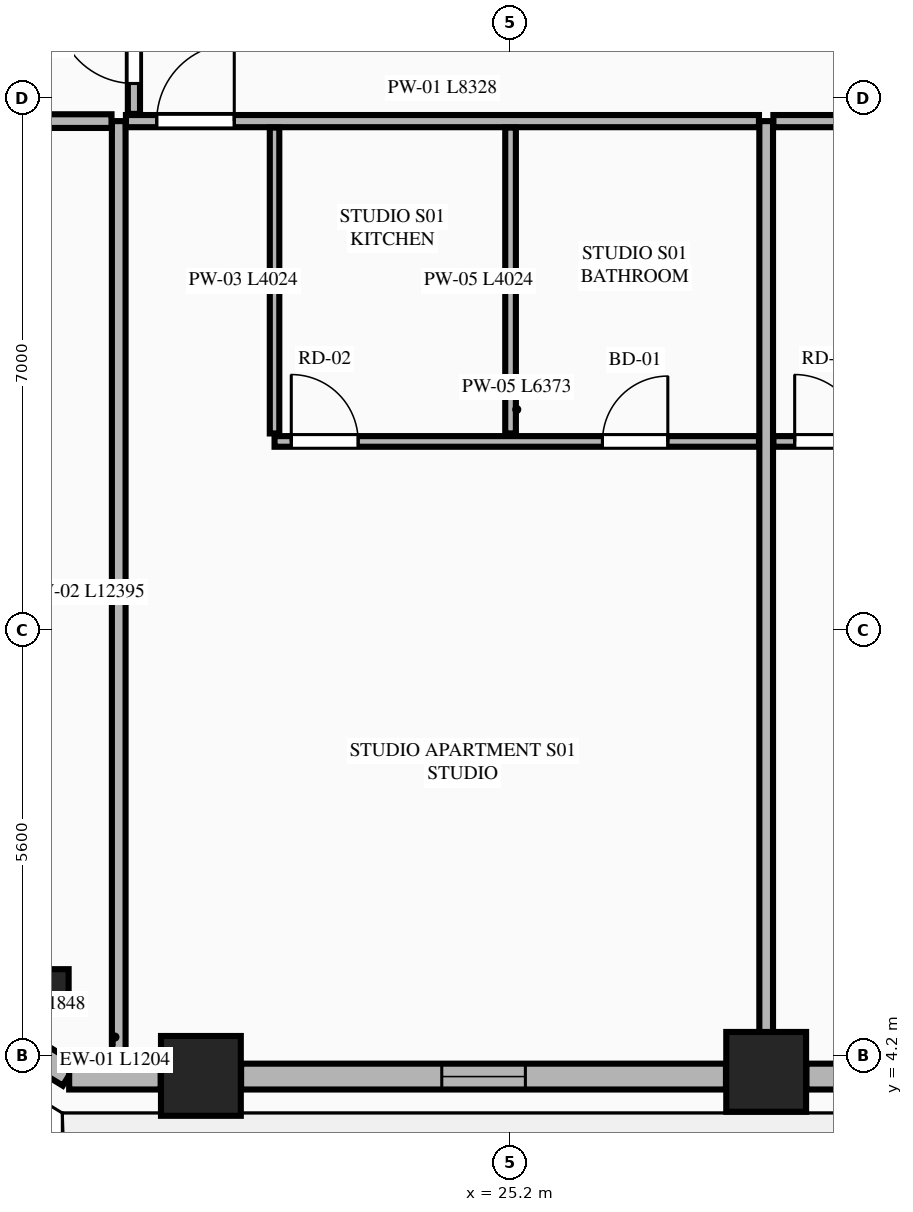
"""IFC4 building model, lengths in metres.
Left out: names, types, materials, properties, quantities, classifications, styles, units other than length and angle.
Written with IfcOpenShell. Run it as: python <this file> out.ifc"""

import sys

from ifc_helpers import new_model, si_unit, direction, frame, frame_2d, origin, origin_2d, place, context, subcontext, project, spatial, rectangle, extrude, element, fill, save


model = new_model("IFC4")
c1 = context("Model", 3, precision=1e-05, world=origin(), true_north=direction((0.0, 1.0)))
c2 = subcontext(c1, "Body", "Model", "MODEL_VIEW")
j1 = project(units=[si_unit("LENGTHUNIT", "METRE"), si_unit("PLANEANGLEUNIT", "RADIAN")], contexts=[c1])
p1 = place(None, origin())
s1 = spatial("IfcSite", under=j1, at=p1, CompositionType="ELEMENT")
p2 = place(p1, origin())
s2 = spatial("IfcBuilding", under=s1, at=p2, CompositionType="ELEMENT")
p3 = place(p2, frame((0.0, 0.0, 112.6)))
s3 = spatial("IfcBuildingStorey", under=s2, at=p3, CompositionType="ELEMENT", Elevation=112.6)
for number, where, z_axis, x_axis in (
    (1, (21.131, 3.939, 0.0), (0.0, 0.0, 1.0), (1.0, 0.0, 0.0)),
    (2, (28.568, 3.992, 0.0), (0.0, 0.0, 1.0), (1.0, 0.0, 0.0)),
):
    element("IfcColumn", number, at=place(p3, frame(where, z_axis=z_axis, x_axis=x_axis)), inside=s3, PredefinedType="COLUMN", context=c2, shape_type="SweptSolid", body=[
        extrude(rectangle(XDim=1.05, YDim=1.05, at=origin_2d()), origin(), (0.0, 0.0, 1.0), 3.55),
    ])
p4 = place(p3, frame((19.141, 5.093, 0.0), z_axis=(0.0, 0.0, 1.0), x_axis=(0.865160173452, -0.501495637342, 0.0)))
e3 = element("IfcColumn", 3, at=p4, inside=s3, PredefinedType="PILASTER", context=c2, shape_type="SweptSolid", body=[
    extrude(rectangle(XDim=0.5, YDim=0.35, at=origin_2d()), origin(), (0.0, 0.0, 1.0), 3.55),
])
p5 = place(p3, frame((17.829, 4.923, 0.0), z_axis=(0.0, 0.0, 1.0), x_axis=(0.851798915137, -0.523868884523, 0.0)))
e4 = element("IfcWall", 4, at=p5, inside=s3, PredefinedType="STANDARD", context=c2, shape_type="SweptSolid", body=[
    extrude(rectangle(XDim=1.848, YDim=0.34, at=frame_2d((0.924, 0.0))), origin(), (0.0, 0.0, 1.0), 3.34),
])
p6 = place(p3, frame((19.398, 3.93, 0.0), z_axis=(0.0, 0.0, 1.0), x_axis=(1.0, 0.0, 0.0)))
e5 = element("IfcWall", 5, at=p6, inside=s3, PredefinedType="STANDARD", context=c2, shape_type="SweptSolid", body=[
    extrude(rectangle(XDim=1.204, YDim=0.34, at=frame_2d((0.602, 0.0))), origin(), (0.0, 0.0, 1.0), 3.34),
])
p7 = place(p3, frame((21.66, 3.93, 0.0), z_axis=(0.0, 0.0, 1.0), x_axis=(1.0, 0.0, 0.0)))
e6 = element("IfcWall", 6, at=p7, inside=s3, PredefinedType="STANDARD", context=c2, shape_type="SweptSolid", body=[
    extrude(rectangle(XDim=6.379, YDim=0.34, at=frame_2d((3.189, 0.0))), origin(), (0.0, 0.0, 1.0), 2.797),
])
p8 = place(p7, frame((2.64, 0.0, 0.75)))
e7 = element("IfcOpeningElement", 7, at=p8, cuts=e6, PredefinedType="OPENING", context=c2, shape_type="SweptSolid", body=[
    extrude(rectangle(XDim=1.1, YDim=1.897, at=frame_2d((0.55, 0.948))), frame((0.0, 0.18, 0.0), z_axis=(0.0, -1.0, 0.0), x_axis=(1.0, 0.0, 0.0)), (0.0, 0.0, 1.0), 0.36),
])
p9 = place(p3, frame((29.097, 3.93, 0.0), z_axis=(0.0, 0.0, 1.0), x_axis=(1.0, 0.0, 0.0)))
e8 = element("IfcWall", 8, at=p9, inside=s3, PredefinedType="STANDARD", context=c2, shape_type="SweptSolid", body=[
    extrude(rectangle(XDim=6.606, YDim=0.34, at=frame_2d((3.303, 0.0))), origin(), (0.0, 0.0, 1.0), 2.797),
])
p10 = place(p9, frame((1.775, 0.0, 0.0)))
e9 = element("IfcOpeningElement", 9, at=p10, cuts=e8, PredefinedType="OPENING", context=c2, shape_type="SweptSolid", body=[
    extrude(rectangle(XDim=1.1, YDim=2.25, at=frame_2d((0.55, 1.125))), frame((0.0, 0.18, 0.0), z_axis=(0.0, -1.0, 0.0), x_axis=(1.0, 0.0, 0.0)), (0.0, 0.0, 1.0), 0.36),
])
p11 = place(p9, frame((5.186, 0.0, 0.75)))
e10 = element("IfcOpeningElement", 10, at=p11, cuts=e8, PredefinedType="OPENING", context=c2, shape_type="SweptSolid", body=[
    extrude(rectangle(XDim=1.1, YDim=1.897, at=frame_2d((0.55, 0.948))), frame((0.0, 0.18, 0.0), z_axis=(0.0, -1.0, 0.0), x_axis=(1.0, 0.0, 0.0)), (0.0, 0.0, 1.0), 0.36),
])
p12 = place(p3, frame((20.05, 4.105, 0.0), z_axis=(0.0, 0.0, 1.0), x_axis=(0.0, 1.0, 0.0)))
e11 = element("IfcWall", 11, at=p12, inside=s3, PredefinedType="PARTITIONING", context=c2, shape_type="SweptSolid", body=[
    extrude(rectangle(XDim=12.395, YDim=0.18, at=frame_2d((6.198, 0.0))), origin(), (0.0, 0.0, 1.0), 3.34),
])
p13 = place(p3, frame((28.568, 4.105, 0.0), z_axis=(0.0, 0.0, 1.0), x_axis=(0.0, 1.0, 0.0)))
e12 = element("IfcWall", 12, at=p13, inside=s3, PredefinedType="PARTITIONING", context=c2, shape_type="SweptSolid", body=[
    extrude(rectangle(XDim=12.395, YDim=0.18, at=frame_2d((6.198, 0.0))), origin(), (0.0, 0.0, 1.0), 2.722),
])
p14 = place(p3, frame((20.145, 16.5, 0.0), z_axis=(0.0, 0.0, 1.0), x_axis=(1.0, 0.0, 0.0)))
e13 = element("IfcWall", 13, at=p14, inside=s3, PredefinedType="PARTITIONING", context=c2, shape_type="SweptSolid", body=[
    extrude(rectangle(XDim=8.328, YDim=0.16, at=frame_2d((4.164, 0.0))), origin(), (0.0, 0.0, 1.0), 3.34),
])
p15 = place(p14, frame((0.405, 0.0, 0.0)))
e14 = element("IfcOpeningElement", 14, at=p15, cuts=e13, PredefinedType="OPENING", context=c2, shape_type="SweptSolid", body=[
    extrude(rectangle(XDim=1.02, YDim=2.25, at=frame_2d((0.51, 1.125))), frame((0.0, 0.09, 0.0), z_axis=(0.0, -1.0, 0.0), x_axis=(1.0, 0.0, 0.0)), (0.0, 0.0, 1.0), 0.18),
])
p16 = place(p3, frame((22.1, 12.391, 0.0), z_axis=(0.0, 0.0, 1.0), x_axis=(0.0, 1.0, 0.0)))
e15 = element("IfcWall", 15, at=p16, inside=s3, PredefinedType="PARTITIONING", context=c2, shape_type="SweptSolid", body=[
    extrude(rectangle(XDim=4.024, YDim=0.125, at=frame_2d((2.012, 0.0))), origin(), (0.0, 0.0, 1.0), 2.722),
])
p17 = place(p3, frame((22.1, 12.286, 0.0), z_axis=(0.0, 0.0, 1.0), x_axis=(1.0, 0.0, 0.0)))
e16 = element("IfcWall", 16, at=p17, inside=s3, PredefinedType="PLUMBINGWALL", context=c2, shape_type="SweptSolid", body=[
    extrude(rectangle(XDim=6.373, YDim=0.14, at=frame_2d((3.187, 0.0))), origin(), (0.0, 0.0, 1.0), 3.34),
])
p18 = place(p17, frame((4.314, 0.0, 0.0)))
e17 = element("IfcOpeningElement", 17, at=p18, cuts=e16, PredefinedType="OPENING", context=c2, shape_type="SweptSolid", body=[
    extrude(rectangle(XDim=0.86, YDim=2.1, at=frame_2d((0.43, 1.05))), frame((0.0, 0.08, 0.0), z_axis=(0.0, -1.0, 0.0), x_axis=(1.0, 0.0, 0.0)), (0.0, 0.0, 1.0), 0.16),
])
p19 = place(p17, frame((0.22, 0.0, 0.0)))
e18 = element("IfcOpeningElement", 18, at=p19, cuts=e16, PredefinedType="OPENING", context=c2, shape_type="SweptSolid", body=[
    extrude(rectangle(XDim=0.88, YDim=2.15, at=frame_2d((0.44, 1.075))), frame((0.0, 0.08, 0.0), z_axis=(0.0, -1.0, 0.0), x_axis=(1.0, 0.0, 0.0)), (0.0, 0.0, 1.0), 0.16),
])
p20 = place(p3, frame((25.205, 12.391, 0.0), z_axis=(0.0, 0.0, 1.0), x_axis=(0.0, 1.0, 0.0)))
e19 = element("IfcWall", 19, at=p20, inside=s3, PredefinedType="PLUMBINGWALL", context=c2, shape_type="SweptSolid", body=[
    extrude(rectangle(XDim=4.024, YDim=0.14, at=frame_2d((2.012, 0.0))), origin(), (0.0, 0.0, 1.0), 3.34),
])
p21 = place(p3, frame((28.663, 16.5, 0.0), z_axis=(0.0, 0.0, 1.0), x_axis=(1.0, 0.0, 0.0)))
e20 = element("IfcWall", 20, at=p21, inside=s3, PredefinedType="PARTITIONING", context=c2, shape_type="SweptSolid", body=[
    extrude(rectangle(XDim=15.992, YDim=0.16, at=frame_2d((7.996, 0.0))), origin(), (0.0, 0.0, 1.0), 3.34),
])
p22 = place(p21, frame((14.087, 0.0, 0.0)))
e21 = element("IfcOpeningElement", 21, at=p22, cuts=e20, PredefinedType="OPENING", context=c2, shape_type="SweptSolid", body=[
    extrude(rectangle(XDim=1.02, YDim=2.25, at=frame_2d((0.51, 1.125))), frame((0.0, 0.09, 0.0), z_axis=(0.0, -1.0, 0.0), x_axis=(1.0, 0.0, 0.0)), (0.0, 0.0, 1.0), 0.18),
])
p23 = place(p3, frame((28.663, 12.286, 0.0), z_axis=(0.0, 0.0, 1.0), x_axis=(1.0, 0.0, 0.0)))
e22 = element("IfcWall", 22, at=p23, inside=s3, PredefinedType="PLUMBINGWALL", context=c2, shape_type="SweptSolid", body=[
    extrude(rectangle(XDim=5.112, YDim=0.14, at=frame_2d((2.556, 0.0))), origin(), (0.0, 0.0, 1.0), 3.34),
])
p24 = place(p23, frame((0.28, 0.0, 0.0)))
e23 = element("IfcOpeningElement", 23, at=p24, cuts=e22, PredefinedType="OPENING", context=c2, shape_type="SweptSolid", body=[
    extrude(rectangle(XDim=0.88, YDim=2.15, at=frame_2d((0.44, 1.075))), frame((0.0, 0.08, 0.0), z_axis=(0.0, -1.0, 0.0), x_axis=(1.0, 0.0, 0.0)), (0.0, 0.0, 1.0), 0.16),
])
p25 = place(p23, frame((1.988, 0.0, 0.0)))
e24 = element("IfcOpeningElement", 24, at=p25, cuts=e22, PredefinedType="OPENING", context=c2, shape_type="SweptSolid", body=[
    extrude(rectangle(XDim=0.86, YDim=2.1, at=frame_2d((0.43, 1.05))), frame((0.0, 0.08, 0.0), z_axis=(0.0, -1.0, 0.0), x_axis=(1.0, 0.0, 0.0)), (0.0, 0.0, 1.0), 0.16),
])
p26 = place(p3, frame((12.185, 16.5, 0.0), z_axis=(0.0, 0.0, 1.0), x_axis=(1.0, 0.0, 0.0)))
e25 = element("IfcWall", 25, at=p26, inside=s3, PredefinedType="PARTITIONING", context=c2, shape_type="SweptSolid", body=[
    extrude(rectangle(XDim=7.77, YDim=0.18, at=frame_2d((3.885, 0.0))), origin(), (0.0, 0.0, 1.0), 3.34),
])
p27 = place(p3, frame((20.25, 16.595, 0.0), z_axis=(0.0, 0.0, 1.0), x_axis=(0.0, 1.0, 0.0)))
e26 = element("IfcWall", 26, at=p27, inside=s3, PredefinedType="PARTITIONING", context=c2, shape_type="SweptSolid", body=[
    extrude(rectangle(XDim=6.39, YDim=0.16, at=frame_2d((3.195, 0.0))), origin(), (0.0, 0.0, 1.0), 3.34),
])
p28 = place(p27, frame((0.4, 0.0, 0.0)))
e27 = element("IfcOpeningElement", 27, at=p28, cuts=e26, PredefinedType="OPENING", context=c2, shape_type="SweptSolid", body=[
    extrude(rectangle(XDim=1.02, YDim=2.25, at=frame_2d((0.51, 1.125))), frame((0.0, 0.09, 0.0), z_axis=(0.0, -1.0, 0.0), x_axis=(1.0, 0.0, 0.0)), (0.0, 0.0, 1.0), 0.18),
])
p29 = place(p8, origin())
e28 = element("IfcWindow", 28, at=p29, inside=s3, PartitioningType="SINGLE_PANEL", PredefinedType="WINDOW", context=c2, shape_type="SweptSolid", body=[
    extrude(rectangle(XDim=1.1, YDim=1.897, at=frame_2d((0.55, 0.948))), frame((0.0, 0.03, 0.0), z_axis=(0.0, -1.0, 0.0), x_axis=(1.0, 0.0, 0.0)), (0.0, 0.0, 1.0), 0.06),
])
fill(e7, e28)
p30 = place(p18, origin())
e29 = element("IfcDoor", 29, at=p30, inside=s3, OperationType="SINGLE_SWING_RIGHT", PredefinedType="DOOR", context=c2, shape_type="SweptSolid", body=[
    extrude(rectangle(XDim=0.86, YDim=2.1, at=frame_2d((0.43, 1.05))), frame((0.0, 0.025, 0.0), z_axis=(0.0, -1.0, 0.0), x_axis=(1.0, 0.0, 0.0)), (0.0, 0.0, 1.0), 0.05),
])
fill(e17, e29)
p31 = place(p15, origin())
e30 = element("IfcDoor", 30, at=p31, inside=s3, OperationType="SINGLE_SWING_RIGHT", PredefinedType="DOOR", context=c2, shape_type="SweptSolid", body=[
    extrude(rectangle(XDim=1.02, YDim=2.25, at=frame_2d((0.51, 1.125))), frame((0.0, 0.025, 0.0), z_axis=(0.0, -1.0, 0.0), x_axis=(1.0, 0.0, 0.0)), (0.0, 0.0, 1.0), 0.05),
])
fill(e14, e30)
p32 = place(p19, origin())
e31 = element("IfcDoor", 31, at=p32, inside=s3, OperationType="SINGLE_SWING_LEFT", PredefinedType="DOOR", context=c2, shape_type="SweptSolid", body=[
    extrude(rectangle(XDim=0.88, YDim=2.15, at=frame_2d((0.44, 1.075))), frame((0.0, 0.025, 0.0), z_axis=(0.0, -1.0, 0.0), x_axis=(1.0, 0.0, 0.0)), (0.0, 0.0, 1.0), 0.05),
])
fill(e18, e31)
p33 = place(p24, origin())
e32 = element("IfcDoor", 32, at=p33, inside=s3, OperationType="SINGLE_SWING_LEFT", PredefinedType="DOOR", context=c2, shape_type="SweptSolid", body=[
    extrude(rectangle(XDim=0.88, YDim=2.15, at=frame_2d((0.44, 1.075))), frame((0.0, 0.025, 0.0), z_axis=(0.0, -1.0, 0.0), x_axis=(1.0, 0.0, 0.0)), (0.0, 0.0, 1.0), 0.05),
])
fill(e23, e32)
p34 = place(p28, origin())
e33 = element("IfcDoor", 33, at=p34, inside=s3, OperationType="SINGLE_SWING_RIGHT", PredefinedType="DOOR", context=c2, shape_type="SweptSolid", body=[
    extrude(rectangle(XDim=1.02, YDim=2.25, at=frame_2d((0.51, 1.125))), frame((0.0, 0.025, 0.0), z_axis=(0.0, -1.0, 0.0), x_axis=(1.0, 0.0, 0.0)), (0.0, 0.0, 1.0), 0.05),
])
fill(e27, e33)
save(model, sys.argv[1])
